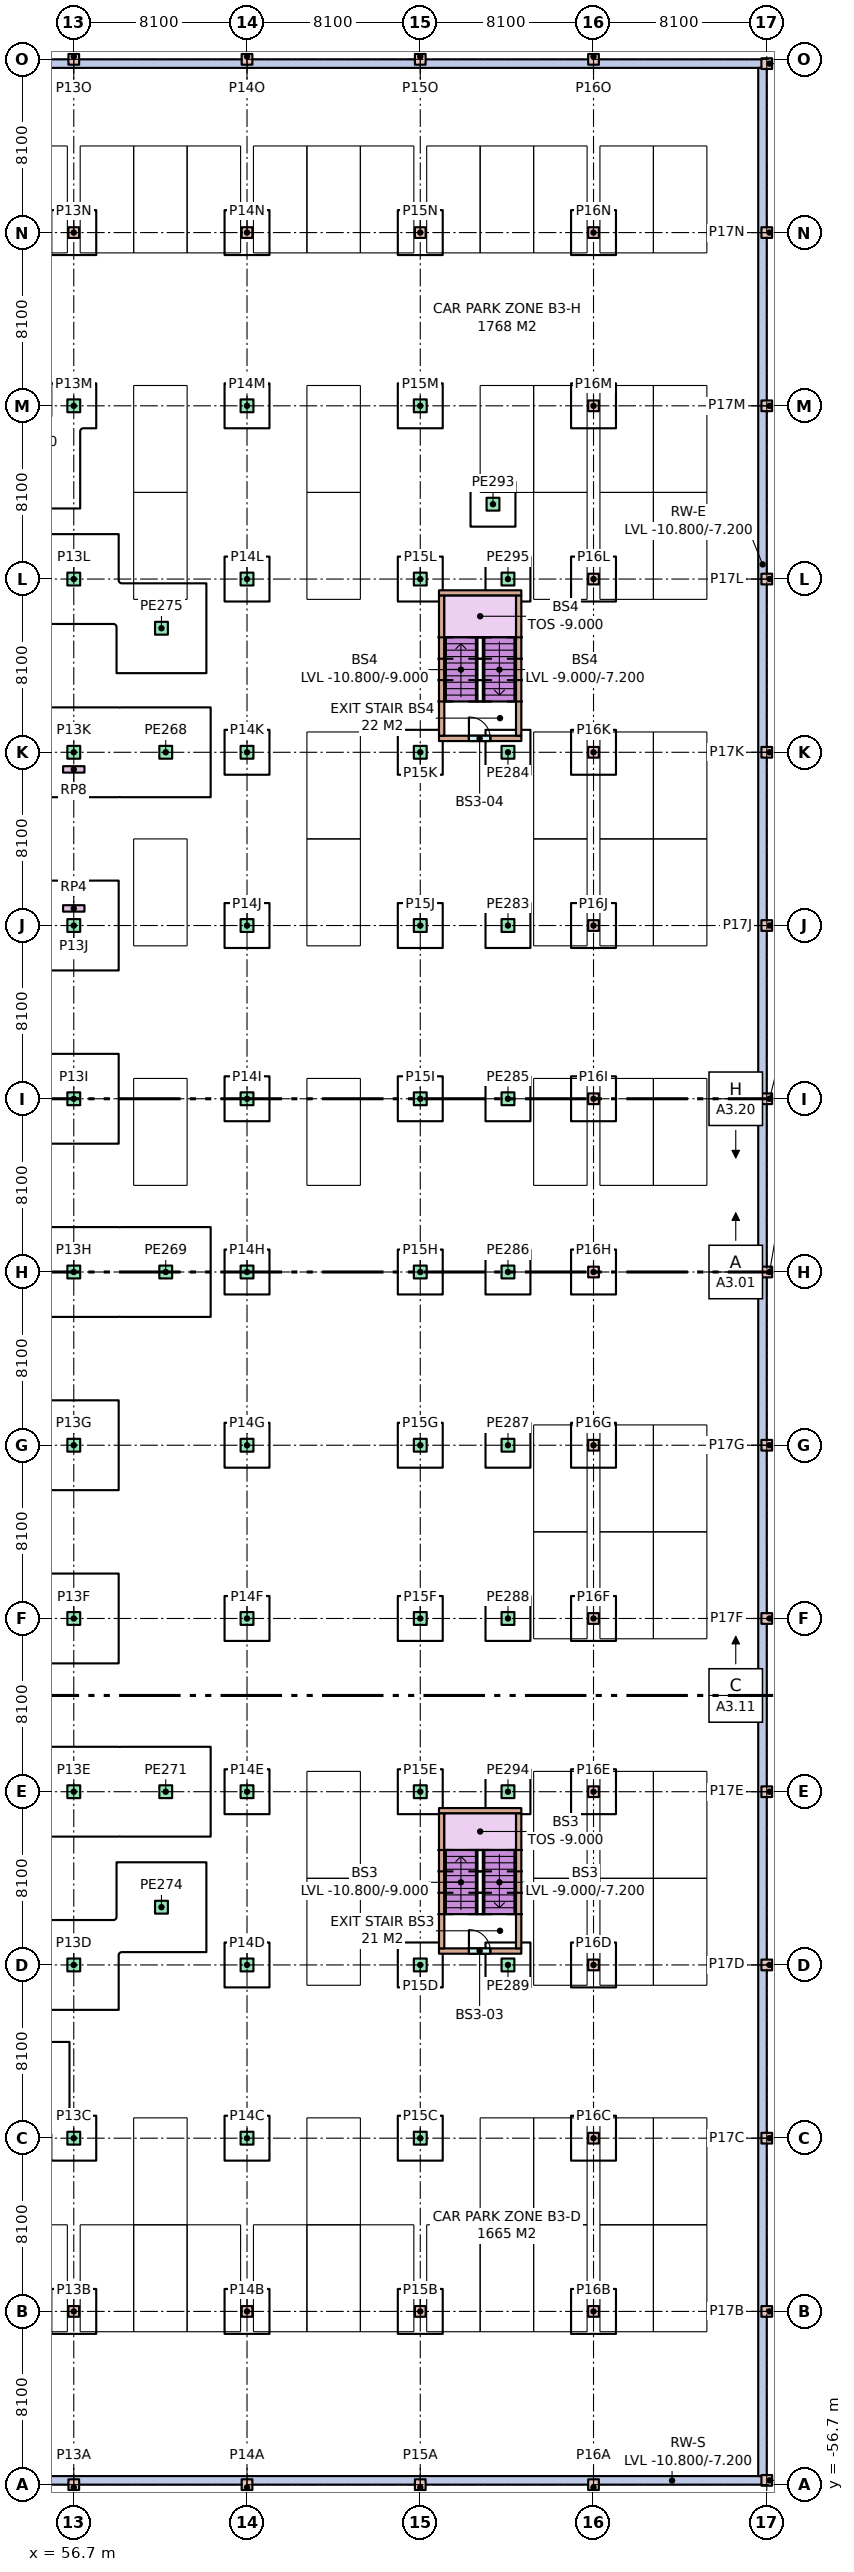
"""IFC4 building model, lengths in metres.
Left out: names, types, materials, properties, quantities, classifications, styles, units other than length and angle.
Written with IfcOpenShell. Run it as: python <this file> out.ifc"""

import sys

from ifc_helpers import new_model, si_unit, direction, frame, frame_2d, origin, origin_2d, place, context, subcontext, project, spatial, rectangle, extrude, element, fill, save


model = new_model("IFC4")
c1 = context("Model", 3, precision=1e-05, world=origin(), true_north=direction((0.0, 1.0)))
c2 = subcontext(c1, "Body", "Model", "MODEL_VIEW")
j1 = project(units=[si_unit("LENGTHUNIT", "METRE"), si_unit("PLANEANGLEUNIT", "RADIAN")], contexts=[c1])
p1 = place(None, origin())
s1 = spatial("IfcSite", under=j1, at=p1, CompositionType="ELEMENT")
p2 = place(p1, origin())
s2 = spatial("IfcBuilding", under=s1, at=p2, CompositionType="ELEMENT")
p3 = place(p2, frame((0.0, 0.0, -10.8)))
s3 = spatial("IfcBuildingStorey", under=s2, at=p3, CompositionType="ELEMENT", Elevation=-10.8)
for number, where, z_axis, x_axis in (
    (1, (-40.5, 56.5, 0.0), (0.0, 0.0, 1.0), (1.0, 0.0, 0.0)),
    (2, (-40.5, -56.5, 0.0), (0.0, 0.0, 1.0), (1.0, 0.0, 0.0)),
):
    element("IfcWall", number, at=place(p3, frame(where, z_axis=z_axis, x_axis=x_axis)), inside=s3, PredefinedType="SOLIDWALL", context=c2, shape_type="SweptSolid", body=[
        extrude(rectangle(XDim=129.6, YDim=0.4, at=frame_2d((64.8, 0.0))), origin(), (0.0, 0.0, 1.0), 3.6),
    ])
p4 = place(p3, frame((88.9, -56.3, 0.0), z_axis=(0.0, 0.0, 1.0), x_axis=(0.0, 1.0, 0.0)))
e3 = element("IfcWall", 3, at=p4, inside=s3, PredefinedType="SOLIDWALL", context=c2, shape_type="SweptSolid", body=[
    extrude(rectangle(XDim=112.6, YDim=0.4, at=frame_2d((56.3, 0.0))), origin(), (0.0, 0.0, 1.0), 3.6),
])
for number, where, z_axis, x_axis in (
    (4, (56.7, -56.7, 0.0), (0.0, 0.0, 1.0), (1.0, 0.0, 0.0)),
    (5, (56.7, -48.6, 0.0), (0.0, 0.0, 1.0), (1.0, 0.0, 0.0)),
):
    element("IfcColumn", number, at=place(p3, frame(where, z_axis=z_axis, x_axis=x_axis)), inside=s3, PredefinedType="COLUMN", context=c2, shape_type="SweptSolid", body=[
        extrude(rectangle(XDim=0.5, YDim=0.5, at=origin_2d()), origin(), (0.0, 0.0, 1.0), 3.6),
    ])
for number, where, z_axis, x_axis in (
    (6, (56.7, -40.5, 0.0), (0.0, 0.0, 1.0), (1.0, 0.0, 0.0)),
    (7, (56.7, -32.4, 0.0), (0.0, 0.0, 1.0), (1.0, 0.0, 0.0)),
    (8, (56.7, -24.3, 0.0), (0.0, 0.0, 1.0), (1.0, 0.0, 0.0)),
    (9, (56.7, -16.2, 0.0), (0.0, 0.0, 1.0), (1.0, 0.0, 0.0)),
    (10, (56.7, -8.1, 0.0), (0.0, 0.0, 1.0), (1.0, 0.0, 0.0)),
    (11, (56.7, 0.0, 0.0), (0.0, 0.0, 1.0), (1.0, 0.0, 0.0)),
    (12, (56.7, 8.1, 0.0), (0.0, 0.0, 1.0), (1.0, 0.0, 0.0)),
    (13, (56.7, 16.2, 0.0), (0.0, 0.0, 1.0), (1.0, 0.0, 0.0)),
    (14, (56.7, 24.3, 0.0), (0.0, 0.0, 1.0), (1.0, 0.0, 0.0)),
    (15, (56.7, 32.4, 0.0), (0.0, 0.0, 1.0), (1.0, 0.0, 0.0)),
    (16, (56.7, 40.5, 0.0), (0.0, 0.0, 1.0), (1.0, 0.0, 0.0)),
):
    element("IfcColumn", number, at=place(p3, frame(where, z_axis=z_axis, x_axis=x_axis)), inside=s3, PredefinedType="COLUMN", context=c2, shape_type="SweptSolid", body=[
        extrude(rectangle(XDim=0.6, YDim=0.6, at=origin_2d()), origin(), (0.0, 0.0, 1.0), 3.6),
    ])
for number, where, z_axis, x_axis in (
    (17, (56.7, 48.6, 0.0), (0.0, 0.0, 1.0), (1.0, 0.0, 0.0)),
    (18, (56.7, 56.7, 0.0), (0.0, 0.0, 1.0), (1.0, 0.0, 0.0)),
    (19, (64.8, -56.7, 0.0), (0.0, 0.0, 1.0), (1.0, 0.0, 0.0)),
    (20, (64.8, -48.6, 0.0), (0.0, 0.0, 1.0), (1.0, 0.0, 0.0)),
):
    element("IfcColumn", number, at=place(p3, frame(where, z_axis=z_axis, x_axis=x_axis)), inside=s3, PredefinedType="COLUMN", context=c2, shape_type="SweptSolid", body=[
        extrude(rectangle(XDim=0.5, YDim=0.5, at=origin_2d()), origin(), (0.0, 0.0, 1.0), 3.6),
    ])
for number, where, z_axis, x_axis in (
    (21, (64.8, -40.5, 0.0), (0.0, 0.0, 1.0), (1.0, 0.0, 0.0)),
    (22, (64.8, -32.4, 0.0), (0.0, 0.0, 1.0), (1.0, 0.0, 0.0)),
    (23, (64.8, -24.3, 0.0), (0.0, 0.0, 1.0), (1.0, 0.0, 0.0)),
    (24, (64.8, -16.2, 0.0), (0.0, 0.0, 1.0), (1.0, 0.0, 0.0)),
    (25, (64.8, -8.1, 0.0), (0.0, 0.0, 1.0), (1.0, 0.0, 0.0)),
    (26, (64.8, 0.0, 0.0), (0.0, 0.0, 1.0), (1.0, 0.0, 0.0)),
    (27, (64.8, 8.1, 0.0), (0.0, 0.0, 1.0), (1.0, 0.0, 0.0)),
    (28, (64.8, 16.2, 0.0), (0.0, 0.0, 1.0), (1.0, 0.0, 0.0)),
    (29, (64.8, 24.3, 0.0), (0.0, 0.0, 1.0), (1.0, 0.0, 0.0)),
    (30, (64.8, 32.4, 0.0), (0.0, 0.0, 1.0), (1.0, 0.0, 0.0)),
    (31, (64.8, 40.5, 0.0), (0.0, 0.0, 1.0), (1.0, 0.0, 0.0)),
):
    element("IfcColumn", number, at=place(p3, frame(where, z_axis=z_axis, x_axis=x_axis)), inside=s3, PredefinedType="COLUMN", context=c2, shape_type="SweptSolid", body=[
        extrude(rectangle(XDim=0.6, YDim=0.6, at=origin_2d()), origin(), (0.0, 0.0, 1.0), 3.6),
    ])
for number, where, z_axis, x_axis in (
    (32, (64.8, 48.6, 0.0), (0.0, 0.0, 1.0), (1.0, 0.0, 0.0)),
    (33, (64.8, 56.7, 0.0), (0.0, 0.0, 1.0), (1.0, 0.0, 0.0)),
    (34, (72.9, -56.7, 0.0), (0.0, 0.0, 1.0), (1.0, 0.0, 0.0)),
    (35, (72.9, -48.6, 0.0), (0.0, 0.0, 1.0), (1.0, 0.0, 0.0)),
):
    element("IfcColumn", number, at=place(p3, frame(where, z_axis=z_axis, x_axis=x_axis)), inside=s3, PredefinedType="COLUMN", context=c2, shape_type="SweptSolid", body=[
        extrude(rectangle(XDim=0.5, YDim=0.5, at=origin_2d()), origin(), (0.0, 0.0, 1.0), 3.6),
    ])
for number, where, z_axis, x_axis in (
    (36, (72.9, -40.5, 0.0), (0.0, 0.0, 1.0), (1.0, 0.0, 0.0)),
    (37, (72.9, -32.4, 0.0), (0.0, 0.0, 1.0), (1.0, 0.0, 0.0)),
    (38, (72.9, -24.3, 0.0), (0.0, 0.0, 1.0), (1.0, 0.0, 0.0)),
    (39, (72.9, -16.2, 0.0), (0.0, 0.0, 1.0), (1.0, 0.0, 0.0)),
    (40, (72.9, -8.1, 0.0), (0.0, 0.0, 1.0), (1.0, 0.0, 0.0)),
    (41, (72.9, 0.0, 0.0), (0.0, 0.0, 1.0), (1.0, 0.0, 0.0)),
    (42, (72.9, 8.1, 0.0), (0.0, 0.0, 1.0), (1.0, 0.0, 0.0)),
    (43, (72.9, 16.2, 0.0), (0.0, 0.0, 1.0), (1.0, 0.0, 0.0)),
    (44, (72.9, 24.3, 0.0), (0.0, 0.0, 1.0), (1.0, 0.0, 0.0)),
    (45, (72.9, 32.4, 0.0), (0.0, 0.0, 1.0), (1.0, 0.0, 0.0)),
    (46, (72.9, 40.5, 0.0), (0.0, 0.0, 1.0), (1.0, 0.0, 0.0)),
):
    element("IfcColumn", number, at=place(p3, frame(where, z_axis=z_axis, x_axis=x_axis)), inside=s3, PredefinedType="COLUMN", context=c2, shape_type="SweptSolid", body=[
        extrude(rectangle(XDim=0.6, YDim=0.6, at=origin_2d()), origin(), (0.0, 0.0, 1.0), 3.6),
    ])
for number, where, z_axis, x_axis in (
    (47, (72.9, 48.6, 0.0), (0.0, 0.0, 1.0), (1.0, 0.0, 0.0)),
    (48, (72.9, 56.7, 0.0), (0.0, 0.0, 1.0), (1.0, 0.0, 0.0)),
    (49, (81.0, -56.7, 0.0), (0.0, 0.0, 1.0), (1.0, 0.0, 0.0)),
    (50, (81.0, -48.6, 0.0), (0.0, 0.0, 1.0), (1.0, 0.0, 0.0)),
    (51, (81.0, -40.5, 0.0), (0.0, 0.0, 1.0), (1.0, 0.0, 0.0)),
    (52, (81.0, -32.4, 0.0), (0.0, 0.0, 1.0), (1.0, 0.0, 0.0)),
    (53, (81.0, -24.3, 0.0), (0.0, 0.0, 1.0), (1.0, 0.0, 0.0)),
    (54, (81.0, -16.2, 0.0), (0.0, 0.0, 1.0), (1.0, 0.0, 0.0)),
    (55, (81.0, -8.1, 0.0), (0.0, 0.0, 1.0), (1.0, 0.0, 0.0)),
    (56, (81.0, 0.0, 0.0), (0.0, 0.0, 1.0), (1.0, 0.0, 0.0)),
    (57, (81.0, 8.1, 0.0), (0.0, 0.0, 1.0), (1.0, 0.0, 0.0)),
    (58, (81.0, 16.2, 0.0), (0.0, 0.0, 1.0), (1.0, 0.0, 0.0)),
    (59, (81.0, 24.3, 0.0), (0.0, 0.0, 1.0), (1.0, 0.0, 0.0)),
    (60, (81.0, 32.4, 0.0), (0.0, 0.0, 1.0), (1.0, 0.0, 0.0)),
    (61, (81.0, 40.5, 0.0), (0.0, 0.0, 1.0), (1.0, 0.0, 0.0)),
    (62, (81.0, 48.6, 0.0), (0.0, 0.0, 1.0), (1.0, 0.0, 0.0)),
    (63, (81.0, 56.7, 0.0), (0.0, 0.0, 1.0), (1.0, 0.0, 0.0)),
    (64, (89.1, -56.5, 0.0), (0.0, 0.0, 1.0), (1.0, 0.0, 0.0)),
    (65, (89.1, -48.6, 0.0), (0.0, 0.0, 1.0), (1.0, 0.0, 0.0)),
    (66, (89.1, -40.5, 0.0), (0.0, 0.0, 1.0), (1.0, 0.0, 0.0)),
    (67, (89.1, -32.4, 0.0), (0.0, 0.0, 1.0), (1.0, 0.0, 0.0)),
    (68, (89.1, -24.3, 0.0), (0.0, 0.0, 1.0), (1.0, 0.0, 0.0)),
    (69, (89.1, -16.2, 0.0), (0.0, 0.0, 1.0), (1.0, 0.0, 0.0)),
    (70, (89.1, -8.1, 0.0), (0.0, 0.0, 1.0), (1.0, 0.0, 0.0)),
    (71, (89.1, 0.0, 0.0), (0.0, 0.0, 1.0), (1.0, 0.0, 0.0)),
    (72, (89.1, 8.1, 0.0), (0.0, 0.0, 1.0), (1.0, 0.0, 0.0)),
    (73, (89.1, 16.2, 0.0), (0.0, 0.0, 1.0), (1.0, 0.0, 0.0)),
    (74, (89.1, 24.3, 0.0), (0.0, 0.0, 1.0), (1.0, 0.0, 0.0)),
    (75, (89.1, 32.4, 0.0), (0.0, 0.0, 1.0), (1.0, 0.0, 0.0)),
    (76, (89.1, 40.5, 0.0), (0.0, 0.0, 1.0), (1.0, 0.0, 0.0)),
    (77, (89.1, 48.6, 0.0), (0.0, 0.0, 1.0), (1.0, 0.0, 0.0)),
    (78, (89.1, 56.5, 0.0), (0.0, 0.0, 1.0), (1.0, 0.0, 0.0)),
):
    element("IfcColumn", number, at=place(p3, frame(where, z_axis=z_axis, x_axis=x_axis)), inside=s3, PredefinedType="COLUMN", context=c2, shape_type="SweptSolid", body=[
        extrude(rectangle(XDim=0.5, YDim=0.5, at=origin_2d()), origin(), (0.0, 0.0, 1.0), 3.6),
    ])
for number, where, z_axis, x_axis in (
    (79, (61.0, 24.3, 0.0), (0.0, 0.0, 1.0), (1.0, 0.0, 0.0)),
    (80, (61.0, 0.0, 0.0), (0.0, 0.0, 1.0), (1.0, 0.0, 0.0)),
    (81, (61.0, -24.3, 0.0), (0.0, 0.0, 1.0), (1.0, 0.0, 0.0)),
    (82, (60.8, -29.7, 0.0), (0.0, 0.0, 1.0), (1.0, 0.0, 0.0)),
    (83, (60.8, 30.1, 0.0), (0.0, 0.0, 1.0), (1.0, 0.0, 0.0)),
    (84, (77.0, 16.2, 0.0), (0.0, 0.0, 1.0), (1.0, 0.0, 0.0)),
    (85, (77.0, 24.3, 0.0), (0.0, 0.0, 1.0), (1.0, 0.0, 0.0)),
    (86, (77.0, 8.1, 0.0), (0.0, 0.0, 1.0), (1.0, 0.0, 0.0)),
    (87, (77.0, 0.0, 0.0), (0.0, 0.0, 1.0), (1.0, 0.0, 0.0)),
    (88, (77.0, -8.1, 0.0), (0.0, 0.0, 1.0), (1.0, 0.0, 0.0)),
    (89, (77.0, -16.2, 0.0), (0.0, 0.0, 1.0), (1.0, 0.0, 0.0)),
    (90, (77.0, -32.4, 0.0), (0.0, 0.0, 1.0), (1.0, 0.0, 0.0)),
    (91, (76.3, 35.9, 0.0), (0.0, 0.0, 1.0), (1.0, 0.0, 0.0)),
    (92, (77.0, -24.3, 0.0), (0.0, 0.0, 1.0), (1.0, 0.0, 0.0)),
    (93, (77.0, 32.4, 0.0), (0.0, 0.0, 1.0), (1.0, 0.0, 0.0)),
):
    element("IfcColumn", number, at=place(p3, frame(where, z_axis=z_axis, x_axis=x_axis)), inside=s3, PredefinedType="COLUMN", context=c2, shape_type="SweptSolid", body=[
        extrude(rectangle(XDim=0.6, YDim=0.6, at=origin_2d()), origin(), (0.0, 0.0, 1.0), 3.6),
    ])
for number, where, z_axis, x_axis in (
    (94, (56.7, 17.0, 0.0), (0.0, 0.0, 1.0), (1.0, 0.0, 0.0)),
    (95, (56.7, 23.5, 0.0), (0.0, 0.0, 1.0), (1.0, 0.0, 0.0)),
):
    element("IfcColumn", number, at=place(p3, frame(where, z_axis=z_axis, x_axis=x_axis)), inside=s3, PredefinedType="COLUMN", context=c2, shape_type="SweptSolid", body=[
        extrude(rectangle(XDim=1.0, YDim=0.3, at=origin_2d()), origin(), (0.0, 0.0, 1.0), 3.6),
    ])
p5 = place(p3, frame((73.775, -31.75, 0.0), z_axis=(0.0, 0.0, 1.0), x_axis=(1.0, 0.0, 0.0)))
e96 = element("IfcWall", 96, at=p5, inside=s3, PredefinedType="STANDARD", context=c2, shape_type="SweptSolid", body=[
    extrude(rectangle(XDim=3.85, YDim=0.25, at=frame_2d((1.925, 0.0))), origin(), (0.0, 0.0, 1.0), 3.28),
])
p6 = place(p5, frame((1.4, 0.0, 0.0)))
e97 = element("IfcOpeningElement", 97, at=p6, cuts=e96, PredefinedType="OPENING", context=c2, shape_type="SweptSolid", body=[
    extrude(rectangle(XDim=1.0, YDim=2.1, at=frame_2d((0.5, 1.05))), frame((0.0, 0.135, 0.0), z_axis=(0.0, -1.0, 0.0), x_axis=(1.0, 0.0, 0.0)), (0.0, 0.0, 1.0), 0.27),
])
p7 = place(p3, frame((73.775, -25.19, 0.0), z_axis=(0.0, 0.0, 1.0), x_axis=(1.0, 0.0, 0.0)))
e98 = element("IfcWall", 98, at=p7, inside=s3, PredefinedType="STANDARD", context=c2, shape_type="SweptSolid", body=[
    extrude(rectangle(XDim=3.85, YDim=0.25, at=frame_2d((1.925, 0.0))), origin(), (0.0, 0.0, 1.0), 3.28),
])
for number, where, z_axis, x_axis in (
    (99, (73.9, -31.625, 0.0), (0.0, 0.0, 1.0), (0.0, 1.0, 0.0)),
    (100, (77.5, -31.625, 0.0), (0.0, 0.0, 1.0), (0.0, 1.0, 0.0)),
):
    element("IfcWall", number, at=place(p3, frame(where, z_axis=z_axis, x_axis=x_axis)), inside=s3, PredefinedType="STANDARD", context=c2, shape_type="SweptSolid", body=[
        extrude(rectangle(XDim=6.31, YDim=0.25, at=frame_2d((3.155, 0.0))), origin(), (0.0, 0.0, 1.0), 3.28),
    ])
p8 = place(p3, frame((73.775, 24.95, 0.0), z_axis=(0.0, 0.0, 1.0), x_axis=(1.0, 0.0, 0.0)))
e101 = element("IfcWall", 101, at=p8, inside=s3, PredefinedType="STANDARD", context=c2, shape_type="SweptSolid", body=[
    extrude(rectangle(XDim=3.85, YDim=0.25, at=frame_2d((1.925, 0.0))), origin(), (0.0, 0.0, 1.0), 3.28),
])
p9 = place(p8, frame((1.4, 0.0, 0.0)))
e102 = element("IfcOpeningElement", 102, at=p9, cuts=e101, PredefinedType="OPENING", context=c2, shape_type="SweptSolid", body=[
    extrude(rectangle(XDim=1.0, YDim=2.1, at=frame_2d((0.5, 1.05))), frame((0.0, 0.135, 0.0), z_axis=(0.0, -1.0, 0.0), x_axis=(1.0, 0.0, 0.0)), (0.0, 0.0, 1.0), 0.27),
])
p10 = place(p3, frame((73.775, 31.75, 0.0), z_axis=(0.0, 0.0, 1.0), x_axis=(1.0, 0.0, 0.0)))
e103 = element("IfcWall", 103, at=p10, inside=s3, PredefinedType="STANDARD", context=c2, shape_type="SweptSolid", body=[
    extrude(rectangle(XDim=3.85, YDim=0.25, at=frame_2d((1.925, 0.0))), origin(), (0.0, 0.0, 1.0), 3.28),
])
for number, where, z_axis, x_axis in (
    (104, (73.9, 25.075, 0.0), (0.0, 0.0, 1.0), (0.0, 1.0, 0.0)),
    (105, (77.5, 25.075, 0.0), (0.0, 0.0, 1.0), (0.0, 1.0, 0.0)),
):
    element("IfcWall", number, at=place(p3, frame(where, z_axis=z_axis, x_axis=x_axis)), inside=s3, PredefinedType="STANDARD", context=c2, shape_type="SweptSolid", body=[
        extrude(rectangle(XDim=6.55, YDim=0.25, at=frame_2d((3.275, 0.0))), origin(), (0.0, 0.0, 1.0), 3.28),
    ])
p11 = place(p6, origin())
e106 = element("IfcDoor", 106, at=p11, inside=s3, OperationType="SINGLE_SWING_LEFT", PredefinedType="DOOR", context=c2, shape_type="SweptSolid", body=[
    extrude(rectangle(XDim=1.0, YDim=2.1, at=frame_2d((0.5, 1.05))), frame((0.0, 0.025, 0.0), z_axis=(0.0, -1.0, 0.0), x_axis=(1.0, 0.0, 0.0)), (0.0, 0.0, 1.0), 0.05),
])
fill(e97, e106)
p12 = place(p9, origin())
e107 = element("IfcDoor", 107, at=p12, inside=s3, OperationType="SINGLE_SWING_LEFT", PredefinedType="DOOR", context=c2, shape_type="SweptSolid", body=[
    extrude(rectangle(XDim=1.0, YDim=2.1, at=frame_2d((0.5, 1.05))), frame((0.0, 0.025, 0.0), z_axis=(0.0, -1.0, 0.0), x_axis=(1.0, 0.0, 0.0)), (0.0, 0.0, 1.0), 0.05),
])
fill(e102, e107)
save(model, sys.argv[1])
